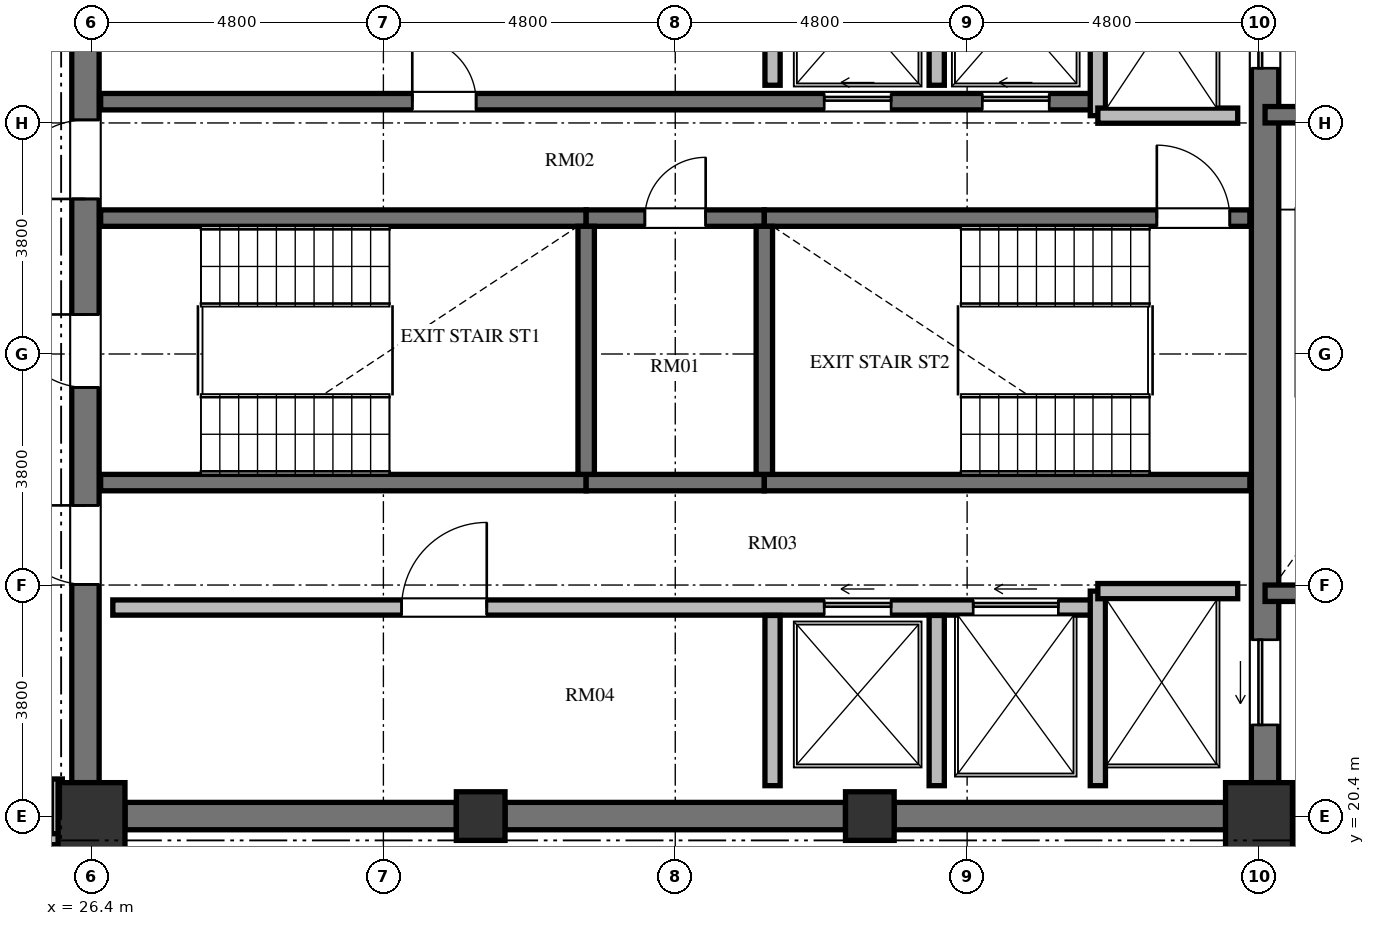
"""IFC4 building model, lengths in metres.
Left out: names, types, materials, properties, quantities, classifications, styles, units other than length and angle.
Written with IfcOpenShell. Run it as: python <this file> out.ifc"""

import sys

from ifc_helpers import new_model, si_unit, direction, frame, frame_2d, origin, origin_2d, place, context, subcontext, project, spatial, rectangle, extrude, element, fill, save


model = new_model("IFC4")
c1 = context("Model", 3, precision=1e-05, world=origin(), true_north=direction((0.0, 1.0)))
c2 = subcontext(c1, "Body", "Model", "MODEL_VIEW")
j1 = project(units=[si_unit("LENGTHUNIT", "METRE"), si_unit("PLANEANGLEUNIT", "RADIAN")], contexts=[c1])
p1 = place(None, origin())
s1 = spatial("IfcSite", under=j1, at=p1, CompositionType="ELEMENT")
p2 = place(p1, origin())
s2 = spatial("IfcBuilding", under=s1, at=p2, CompositionType="ELEMENT")
p3 = place(p2, frame((0.0, 0.0, 238.608)))
s3 = spatial("IfcBuildingStorey", under=s2, at=p3, CompositionType="ELEMENT", Elevation=238.608)
p4 = place(p3, frame((26.4, 20.4, 0.0), z_axis=(0.0, 0.0, 1.0), x_axis=(1.0, 0.0, 0.0)))
e1 = element("IfcColumn", 1, at=p4, inside=s3, PredefinedType="COLUMN", context=c2, shape_type="SweptSolid", body=[
    extrude(rectangle(XDim=1.1, YDim=1.1, at=origin_2d()), origin(), (0.0, 0.0, 1.0), 3.648),
])
for number, where, z_axis, x_axis in (
    (2, (32.8, 20.4, 0.0), (0.0, 0.0, 1.0), (1.0, 0.0, 0.0)),
    (3, (39.2, 20.4, 0.0), (0.0, 0.0, 1.0), (1.0, 0.0, 0.0)),
):
    element("IfcColumn", number, at=place(p3, frame(where, z_axis=z_axis, x_axis=x_axis)), inside=s3, PredefinedType="COLUMN", context=c2, shape_type="SweptSolid", body=[
        extrude(rectangle(XDim=0.8, YDim=0.8, at=origin_2d()), origin(), (0.0, 0.0, 1.0), 3.648),
    ])
p5 = place(p3, frame((45.6, 20.4, 0.0), z_axis=(0.0, 0.0, 1.0), x_axis=(1.0, 0.0, 0.0)))
e4 = element("IfcColumn", 4, at=p5, inside=s3, PredefinedType="COLUMN", context=c2, shape_type="SweptSolid", body=[
    extrude(rectangle(XDim=1.1, YDim=1.1, at=origin_2d()), origin(), (0.0, 0.0, 1.0), 3.648),
])
p6 = place(p3, frame((26.3, 20.95, 0.0), z_axis=(0.0, 0.0, 1.0), x_axis=(0.0, 1.0, 0.0)))
e5 = element("IfcWall", 5, at=p6, inside=s3, PredefinedType="SHEAR", context=c2, shape_type="SweptSolid", body=[
    extrude(rectangle(XDim=14.1, YDim=0.45, at=frame_2d((7.05, 0.0))), origin(), (0.0, 0.0, 1.0), 3.648),
])
p7 = place(p6, frame((6.5, 0.0, 0.0)))
e6 = element("IfcOpeningElement", 6, at=p7, cuts=e5, PredefinedType="OPENING", context=c2, shape_type="SweptSolid", body=[
    extrude(rectangle(XDim=1.2, YDim=2.15, at=frame_2d((0.6, 1.075))), frame((0.0, 0.235, 0.0), z_axis=(0.0, -1.0, 0.0), x_axis=(1.0, 0.0, 0.0)), (0.0, 0.0, 1.0), 0.47),
])
p8 = place(p6, frame((9.6, 0.0, 0.0)))
e7 = element("IfcOpeningElement", 7, at=p8, cuts=e5, PredefinedType="OPENING", context=c2, shape_type="SweptSolid", body=[
    extrude(rectangle(XDim=1.3, YDim=2.2, at=frame_2d((0.65, 1.1))), frame((0.0, 0.235, 0.0), z_axis=(0.0, -1.0, 0.0), x_axis=(1.0, 0.0, 0.0)), (0.0, 0.0, 1.0), 0.47),
])
p9 = place(p6, frame((3.26, 0.0, 0.0)))
e8 = element("IfcOpeningElement", 8, at=p9, cuts=e5, PredefinedType="OPENING", context=c2, shape_type="SweptSolid", body=[
    extrude(rectangle(XDim=1.3, YDim=2.2, at=frame_2d((0.65, 1.1))), frame((0.0, 0.235, 0.0), z_axis=(0.0, -1.0, 0.0), x_axis=(1.0, 0.0, 0.0)), (0.0, 0.0, 1.0), 0.47),
])
p10 = place(p3, frame((45.7, 20.95, 0.0), z_axis=(0.0, 0.0, 1.0), x_axis=(0.0, 1.0, 0.0)))
e9 = element("IfcWall", 9, at=p10, inside=s3, PredefinedType="SHEAR", context=c2, shape_type="SweptSolid", body=[
    extrude(rectangle(XDim=14.1, YDim=0.45, at=frame_2d((7.05, 0.0))), origin(), (0.0, 0.0, 1.0), 3.648),
])
p11 = place(p10, frame((11.75, 0.0, 0.0)))
e10 = element("IfcOpeningElement", 10, at=p11, cuts=e9, PredefinedType="OPENING", context=c2, shape_type="SweptSolid", body=[
    extrude(rectangle(XDim=1.4, YDim=2.3, at=frame_2d((0.7, 1.15))), frame((0.0, 0.235, 0.0), z_axis=(0.0, -1.0, 0.0), x_axis=(1.0, 0.0, 0.0)), (0.0, 0.0, 1.0), 0.47),
])
p12 = place(p10, frame((0.95, 0.0, 0.0)))
e11 = element("IfcOpeningElement", 11, at=p12, cuts=e9, PredefinedType="OPENING", context=c2, shape_type="SweptSolid", body=[
    extrude(rectangle(XDim=1.4, YDim=2.3, at=frame_2d((0.7, 1.15))), frame((0.0, 0.235, 0.0), z_axis=(0.0, -1.0, 0.0), x_axis=(1.0, 0.0, 0.0)), (0.0, 0.0, 1.0), 0.47),
])
p13 = place(p3, frame((26.95, 20.4, 0.0), z_axis=(0.0, 0.0, 1.0), x_axis=(1.0, 0.0, 0.0)))
e12 = element("IfcWall", 12, at=p13, inside=s3, PredefinedType="SHEAR", context=c2, shape_type="SweptSolid", body=[
    extrude(rectangle(XDim=5.45, YDim=0.45, at=frame_2d((2.725, 0.0))), origin(), (0.0, 0.0, 1.0), 3.648),
])
p14 = place(p3, frame((33.2, 20.4, 0.0), z_axis=(0.0, 0.0, 1.0), x_axis=(1.0, 0.0, 0.0)))
e13 = element("IfcWall", 13, at=p14, inside=s3, PredefinedType="SHEAR", context=c2, shape_type="SweptSolid", body=[
    extrude(rectangle(XDim=5.6, YDim=0.45, at=frame_2d((2.8, 0.0))), origin(), (0.0, 0.0, 1.0), 3.648),
])
p15 = place(p3, frame((39.6, 20.4, 0.0), z_axis=(0.0, 0.0, 1.0), x_axis=(1.0, 0.0, 0.0)))
e14 = element("IfcWall", 14, at=p15, inside=s3, PredefinedType="SHEAR", context=c2, shape_type="SweptSolid", body=[
    extrude(rectangle(XDim=5.45, YDim=0.45, at=frame_2d((2.725, 0.0))), origin(), (0.0, 0.0, 1.0), 3.648),
])
p16 = place(p3, frame((26.55, 30.235, 0.0), z_axis=(0.0, 0.0, 1.0), x_axis=(1.0, 0.0, 0.0)))
e15 = element("IfcWall", 15, at=p16, inside=s3, PredefinedType="SHEAR", context=c2, shape_type="SweptSolid", body=[
    extrude(rectangle(XDim=7.985, YDim=0.27, at=frame_2d((3.992, 0.0))), origin(), (0.0, 0.0, 1.0), 3.648),
])
p17 = place(p3, frame((34.535, 30.235, 0.0), z_axis=(0.0, 0.0, 1.0), x_axis=(1.0, 0.0, 0.0)))
e16 = element("IfcWall", 16, at=p17, inside=s3, PredefinedType="SHEAR", context=c2, shape_type="SweptSolid", body=[
    extrude(rectangle(XDim=2.93, YDim=0.27, at=frame_2d((1.465, 0.0))), origin(), (0.0, 0.0, 1.0), 3.648),
])
p18 = place(p17, frame((0.965, 0.0, 0.0)))
e17 = element("IfcOpeningElement", 17, at=p18, cuts=e16, PredefinedType="OPENING", context=c2, shape_type="SweptSolid", body=[
    extrude(rectangle(XDim=1.0, YDim=2.1, at=frame_2d((0.5, 1.05))), frame((0.0, 0.145, 0.0), z_axis=(0.0, -1.0, 0.0), x_axis=(1.0, 0.0, 0.0)), (0.0, 0.0, 1.0), 0.29),
])
p19 = place(p3, frame((37.465, 30.235, 0.0), z_axis=(0.0, 0.0, 1.0), x_axis=(1.0, 0.0, 0.0)))
e18 = element("IfcWall", 18, at=p19, inside=s3, PredefinedType="SHEAR", context=c2, shape_type="SweptSolid", body=[
    extrude(rectangle(XDim=7.985, YDim=0.27, at=frame_2d((3.992, 0.0))), origin(), (0.0, 0.0, 1.0), 3.648),
])
p20 = place(p19, frame((6.455, 0.0, 0.0)))
e19 = element("IfcOpeningElement", 19, at=p20, cuts=e18, PredefinedType="OPENING", context=c2, shape_type="SweptSolid", body=[
    extrude(rectangle(XDim=1.2, YDim=2.15, at=frame_2d((0.6, 1.075))), frame((0.0, 0.145, 0.0), z_axis=(0.0, -1.0, 0.0), x_axis=(1.0, 0.0, 0.0)), (0.0, 0.0, 1.0), 0.29),
])
p21 = place(p3, frame((26.55, 25.885, 0.0), z_axis=(0.0, 0.0, 1.0), x_axis=(1.0, 0.0, 0.0)))
e20 = element("IfcWall", 20, at=p21, inside=s3, PredefinedType="SHEAR", context=c2, shape_type="SweptSolid", body=[
    extrude(rectangle(XDim=7.985, YDim=0.27, at=frame_2d((3.992, 0.0))), origin(), (0.0, 0.0, 1.0), 3.648),
])
p22 = place(p3, frame((34.535, 25.885, 0.0), z_axis=(0.0, 0.0, 1.0), x_axis=(1.0, 0.0, 0.0)))
e21 = element("IfcWall", 21, at=p22, inside=s3, PredefinedType="SHEAR", context=c2, shape_type="SweptSolid", body=[
    extrude(rectangle(XDim=2.93, YDim=0.27, at=frame_2d((1.465, 0.0))), origin(), (0.0, 0.0, 1.0), 3.648),
])
p23 = place(p3, frame((37.465, 25.885, 0.0), z_axis=(0.0, 0.0, 1.0), x_axis=(1.0, 0.0, 0.0)))
e22 = element("IfcWall", 22, at=p23, inside=s3, PredefinedType="SHEAR", context=c2, shape_type="SweptSolid", body=[
    extrude(rectangle(XDim=7.985, YDim=0.27, at=frame_2d((3.992, 0.0))), origin(), (0.0, 0.0, 1.0), 3.648),
])
for number, where, z_axis, x_axis in (
    (23, (34.535, 26.02, 0.0), (0.0, 0.0, 1.0), (0.0, 1.0, 0.0)),
    (24, (37.465, 26.02, 0.0), (0.0, 0.0, 1.0), (0.0, 1.0, 0.0)),
):
    element("IfcWall", number, at=place(p3, frame(where, z_axis=z_axis, x_axis=x_axis)), inside=s3, PredefinedType="SHEAR", context=c2, shape_type="SweptSolid", body=[
        extrude(rectangle(XDim=4.08, YDim=0.27, at=frame_2d((2.04, 0.0))), origin(), (0.0, 0.0, 1.0), 3.648),
    ])
p24 = place(p3, frame((26.55, 32.15, 0.0), z_axis=(0.0, 0.0, 1.0), x_axis=(1.0, 0.0, 0.0)))
e25 = element("IfcWall", 25, at=p24, inside=s3, PredefinedType="SHEAR", context=c2, shape_type="SweptSolid", body=[
    extrude(rectangle(XDim=16.4, YDim=0.27, at=frame_2d((8.2, 0.0))), origin(), (0.0, 0.0, 1.0), 3.648),
])
p25 = place(p24, frame((5.125, 0.0, 0.0)))
e26 = element("IfcOpeningElement", 26, at=p25, cuts=e25, PredefinedType="OPENING", context=c2, shape_type="SweptSolid", body=[
    extrude(rectangle(XDim=1.05, YDim=2.15, at=frame_2d((0.525, 1.075))), frame((0.0, 0.145, 0.0), z_axis=(0.0, -1.0, 0.0), x_axis=(1.0, 0.0, 0.0)), (0.0, 0.0, 1.0), 0.29),
])
p26 = place(p24, frame((11.9, 0.0, 0.0)))
e27 = element("IfcOpeningElement", 27, at=p26, cuts=e25, PredefinedType="OPENING", context=c2, shape_type="SweptSolid", body=[
    extrude(rectangle(XDim=1.1, YDim=2.2, at=frame_2d((0.55, 1.1))), frame((0.0, 0.145, 0.0), z_axis=(0.0, -1.0, 0.0), x_axis=(1.0, 0.0, 0.0)), (0.0, 0.0, 1.0), 0.29),
])
p27 = place(p24, frame((14.5, 0.0, 0.0)))
e28 = element("IfcOpeningElement", 28, at=p27, cuts=e25, PredefinedType="OPENING", context=c2, shape_type="SweptSolid", body=[
    extrude(rectangle(XDim=1.1, YDim=2.2, at=frame_2d((0.55, 1.1))), frame((0.0, 0.145, 0.0), z_axis=(0.0, -1.0, 0.0), x_axis=(1.0, 0.0, 0.0)), (0.0, 0.0, 1.0), 0.29),
])
p28 = place(p3, frame((26.75, 23.83, 0.0), z_axis=(0.0, 0.0, 1.0), x_axis=(1.0, 0.0, 0.0)))
e29 = element("IfcWall", 29, at=p28, inside=s3, PredefinedType="SOLIDWALL", context=c2, shape_type="SweptSolid", body=[
    extrude(rectangle(XDim=16.2, YDim=0.25, at=frame_2d((8.1, 0.0))), origin(), (0.0, 0.0, 1.0), 3.448),
])
p29 = place(p28, frame((4.75, 0.0, 0.0)))
e30 = element("IfcOpeningElement", 30, at=p29, cuts=e29, PredefinedType="OPENING", context=c2, shape_type="SweptSolid", body=[
    extrude(rectangle(XDim=1.4, YDim=2.2, at=frame_2d((0.7, 1.1))), frame((0.0, 0.135, 0.0), z_axis=(0.0, -1.0, 0.0), x_axis=(1.0, 0.0, 0.0)), (0.0, 0.0, 1.0), 0.27),
])
p30 = place(p28, frame((11.7, 0.0, 0.0)))
e31 = element("IfcOpeningElement", 31, at=p30, cuts=e29, PredefinedType="OPENING", context=c2, shape_type="SweptSolid", body=[
    extrude(rectangle(XDim=1.1, YDim=2.2, at=frame_2d((0.55, 1.1))), frame((0.0, 0.135, 0.0), z_axis=(0.0, -1.0, 0.0), x_axis=(1.0, 0.0, 0.0)), (0.0, 0.0, 1.0), 0.27),
])
p31 = place(p28, frame((14.15, 0.0, 0.0)))
e32 = element("IfcOpeningElement", 32, at=p31, cuts=e29, PredefinedType="OPENING", context=c2, shape_type="SweptSolid", body=[
    extrude(rectangle(XDim=1.4, YDim=2.3, at=frame_2d((0.7, 1.15))), frame((0.0, 0.135, 0.0), z_axis=(0.0, -1.0, 0.0), x_axis=(1.0, 0.0, 0.0)), (0.0, 0.0, 1.0), 0.27),
])
p32 = place(p3, frame((42.95, 31.92, 0.0), z_axis=(0.0, 0.0, 1.0), x_axis=(0.0, 1.0, 0.0)))
e33 = element("IfcWall", 33, at=p32, inside=s3, PredefinedType="SOLIDWALL", context=c2, shape_type="SweptSolid", body=[
    extrude(rectangle(XDim=3.18, YDim=0.25, at=frame_2d((1.59, 0.0))), origin(), (0.0, 0.0, 1.0), 3.448),
])
p33 = place(p3, frame((42.95, 31.92, 0.0), z_axis=(0.0, 0.0, 1.0), x_axis=(1.0, 0.0, 0.0)))
e34 = element("IfcWall", 34, at=p33, inside=s3, PredefinedType="SOLIDWALL", context=c2, shape_type="SweptSolid", body=[
    extrude(rectangle(XDim=2.3, YDim=0.25, at=frame_2d((1.15, 0.0))), origin(), (0.0, 0.0, 1.0), 3.448),
])
p34 = place(p3, frame((42.95, 20.9, 0.0), z_axis=(0.0, 0.0, 1.0), x_axis=(0.0, 1.0, 0.0)))
e35 = element("IfcWall", 35, at=p34, inside=s3, PredefinedType="SOLIDWALL", context=c2, shape_type="SweptSolid", body=[
    extrude(rectangle(XDim=3.2, YDim=0.25, at=frame_2d((1.6, 0.0))), origin(), (0.0, 0.0, 1.0), 3.448),
])
p35 = place(p3, frame((42.95, 24.1, 0.0), z_axis=(0.0, 0.0, 1.0), x_axis=(1.0, 0.0, 0.0)))
e36 = element("IfcWall", 36, at=p35, inside=s3, PredefinedType="SOLIDWALL", context=c2, shape_type="SweptSolid", body=[
    extrude(rectangle(XDim=2.3, YDim=0.25, at=frame_2d((1.15, 0.0))), origin(), (0.0, 0.0, 1.0), 3.448),
])
p36 = place(p3, frame((37.6, 32.42, 0.0), z_axis=(0.0, 0.0, 1.0), x_axis=(0.0, 1.0, 0.0)))
e37 = element("IfcWall", 37, at=p36, inside=s3, PredefinedType="SOLIDWALL", context=c2, shape_type="SweptSolid", body=[
    extrude(rectangle(XDim=2.68, YDim=0.25, at=frame_2d((1.34, 0.0))), origin(), (0.0, 0.0, 1.0), 3.448),
])
p37 = place(p3, frame((37.6, 20.9, 0.0), z_axis=(0.0, 0.0, 1.0), x_axis=(0.0, 1.0, 0.0)))
e38 = element("IfcWall", 38, at=p37, inside=s3, PredefinedType="SOLIDWALL", context=c2, shape_type="SweptSolid", body=[
    extrude(rectangle(XDim=2.8, YDim=0.25, at=frame_2d((1.4, 0.0))), origin(), (0.0, 0.0, 1.0), 3.448),
])
p38 = place(p3, frame((40.3, 32.42, 0.0), z_axis=(0.0, 0.0, 1.0), x_axis=(0.0, 1.0, 0.0)))
e39 = element("IfcWall", 39, at=p38, inside=s3, PredefinedType="SOLIDWALL", context=c2, shape_type="SweptSolid", body=[
    extrude(rectangle(XDim=2.68, YDim=0.25, at=frame_2d((1.34, 0.0))), origin(), (0.0, 0.0, 1.0), 3.448),
])
p39 = place(p3, frame((40.3, 20.9, 0.0), z_axis=(0.0, 0.0, 1.0), x_axis=(0.0, 1.0, 0.0)))
e40 = element("IfcWall", 40, at=p39, inside=s3, PredefinedType="SOLIDWALL", context=c2, shape_type="SweptSolid", body=[
    extrude(rectangle(XDim=2.8, YDim=0.25, at=frame_2d((1.4, 0.0))), origin(), (0.0, 0.0, 1.0), 3.448),
])
for number, where, z_axis, x_axis in (
    (41, (45.7, 31.935, 0.0), (0.0, 0.0, 1.0), (1.0, 0.0, 0.0)),
    (42, (45.7, 24.065, 0.0), (0.0, 0.0, 1.0), (1.0, 0.0, 0.0)),
):
    element("IfcWall", number, at=place(p3, frame(where, z_axis=z_axis, x_axis=x_axis)), inside=s3, PredefinedType="SHEAR", context=c2, shape_type="SweptSolid", body=[
        extrude(rectangle(XDim=4.715, YDim=0.27, at=frame_2d((2.357, 0.0))), origin(), (0.0, 0.0, 1.0), 3.648),
    ])
p40 = place(p3, frame((45.7, 20.02, 0.0), z_axis=(0.0, 0.0, 1.0), x_axis=(1.0, 0.0, 0.0)))
e43 = element("IfcWall", 43, at=p40, inside=s3, PredefinedType="SOLIDWALL", context=c2, shape_type="SweptSolid", body=[
    extrude(rectangle(XDim=4.715, YDim=0.25, at=frame_2d((2.357, 0.0))), origin(), (0.0, 0.0, 1.0), 3.448),
])
p41 = place(p3, frame((25.83, 21.01, 0.0), z_axis=(0.0, 0.0, 1.0), x_axis=(0.0, -1.0, 0.0)))
e44 = element("IfcWall", 44, at=p41, inside=s3, PredefinedType="PARTITIONING", context=c2, shape_type="SweptSolid", body=[
    extrude(rectangle(XDim=1.03, YDim=0.18, at=frame_2d((0.515, 0.0))), origin(), (0.0, 0.0, 1.0), 3.448),
])
p42 = place(p3, frame((25.87, 20.02, 0.0), z_axis=(0.0, 0.0, 1.0), x_axis=(-1.0, 0.0, 0.0)))
e45 = element("IfcWall", 45, at=p42, inside=s3, PredefinedType="PARTITIONING", context=c2, shape_type="SweptSolid", body=[
    extrude(rectangle(XDim=2.56, YDim=0.18, at=frame_2d((1.28, 0.0))), origin(), (0.0, 0.0, 1.0), 3.448),
])
p43 = place(p7, origin())
e46 = element("IfcDoor", 46, at=p43, inside=s3, OperationType="SINGLE_SWING_RIGHT", PredefinedType="DOOR", context=c2, shape_type="SweptSolid", body=[
    extrude(rectangle(XDim=1.2, YDim=2.15, at=frame_2d((0.6, 1.075))), frame((0.0, 0.025, 0.0), z_axis=(0.0, -1.0, 0.0), x_axis=(1.0, 0.0, 0.0)), (0.0, 0.0, 1.0), 0.05),
])
fill(e6, e46)
p44 = place(p20, origin())
e47 = element("IfcDoor", 47, at=p44, inside=s3, OperationType="SINGLE_SWING_LEFT", PredefinedType="DOOR", context=c2, shape_type="SweptSolid", body=[
    extrude(rectangle(XDim=1.2, YDim=2.15, at=frame_2d((0.6, 1.075))), frame((0.0, 0.025, 0.0), z_axis=(0.0, -1.0, 0.0), x_axis=(1.0, 0.0, 0.0)), (0.0, 0.0, 1.0), 0.05),
])
fill(e19, e47)
p45 = place(p18, origin())
e48 = element("IfcDoor", 48, at=p45, inside=s3, OperationType="SINGLE_SWING_RIGHT", PredefinedType="DOOR", context=c2, shape_type="SweptSolid", body=[
    extrude(rectangle(XDim=1.0, YDim=2.1, at=frame_2d((0.5, 1.05))), frame((0.0, 0.025, 0.0), z_axis=(0.0, -1.0, 0.0), x_axis=(1.0, 0.0, 0.0)), (0.0, 0.0, 1.0), 0.05),
])
fill(e17, e48)
p46 = place(p8, origin())
e49 = element("IfcDoor", 49, at=p46, inside=s3, OperationType="SINGLE_SWING_LEFT", PredefinedType="DOOR", context=c2, shape_type="SweptSolid", body=[
    extrude(rectangle(XDim=1.3, YDim=2.2, at=frame_2d((0.65, 1.1))), frame((0.0, 0.025, 0.0), z_axis=(0.0, -1.0, 0.0), x_axis=(1.0, 0.0, 0.0)), (0.0, 0.0, 1.0), 0.05),
])
fill(e7, e49)
p47 = place(p9, origin())
e50 = element("IfcDoor", 50, at=p47, inside=s3, OperationType="SINGLE_SWING_RIGHT", PredefinedType="DOOR", context=c2, shape_type="SweptSolid", body=[
    extrude(rectangle(XDim=1.3, YDim=2.2, at=frame_2d((0.65, 1.1))), frame((0.0, 0.025, 0.0), z_axis=(0.0, -1.0, 0.0), x_axis=(1.0, 0.0, 0.0)), (0.0, 0.0, 1.0), 0.05),
])
fill(e8, e50)
p48 = place(p25, origin())
e51 = element("IfcDoor", 51, at=p48, inside=s3, OperationType="SINGLE_SWING_LEFT", PredefinedType="DOOR", context=c2, shape_type="SweptSolid", body=[
    extrude(rectangle(XDim=1.05, YDim=2.15, at=frame_2d((0.525, 1.075))), frame((0.0, 0.025, 0.0), z_axis=(0.0, -1.0, 0.0), x_axis=(1.0, 0.0, 0.0)), (0.0, 0.0, 1.0), 0.05),
])
fill(e26, e51)
p49 = place(p29, origin())
e52 = element("IfcDoor", 52, at=p49, inside=s3, OperationType="SINGLE_SWING_RIGHT", PredefinedType="DOOR", context=c2, shape_type="SweptSolid", body=[
    extrude(rectangle(XDim=1.4, YDim=2.2, at=frame_2d((0.7, 1.1))), frame((0.0, 0.025, 0.0), z_axis=(0.0, -1.0, 0.0), x_axis=(1.0, 0.0, 0.0)), (0.0, 0.0, 1.0), 0.05),
])
fill(e30, e52)
p50 = place(p26, origin())
e53 = element("IfcDoor", 53, at=p50, inside=s3, OperationType="SLIDING_TO_LEFT", PredefinedType="DOOR", context=c2, shape_type="SweptSolid", body=[
    extrude(rectangle(XDim=1.1, YDim=2.2, at=frame_2d((0.55, 1.1))), frame((0.0, 0.025, 0.0), z_axis=(0.0, -1.0, 0.0), x_axis=(1.0, 0.0, 0.0)), (0.0, 0.0, 1.0), 0.05),
])
fill(e27, e53)
p51 = place(p27, origin())
e54 = element("IfcDoor", 54, at=p51, inside=s3, OperationType="SLIDING_TO_LEFT", PredefinedType="DOOR", context=c2, shape_type="SweptSolid", body=[
    extrude(rectangle(XDim=1.1, YDim=2.2, at=frame_2d((0.55, 1.1))), frame((0.0, 0.025, 0.0), z_axis=(0.0, -1.0, 0.0), x_axis=(1.0, 0.0, 0.0)), (0.0, 0.0, 1.0), 0.05),
])
fill(e28, e54)
p52 = place(p30, origin())
e55 = element("IfcDoor", 55, at=p52, inside=s3, OperationType="SLIDING_TO_LEFT", PredefinedType="DOOR", context=c2, shape_type="SweptSolid", body=[
    extrude(rectangle(XDim=1.1, YDim=2.2, at=frame_2d((0.55, 1.1))), frame((0.0, 0.025, 0.0), z_axis=(0.0, -1.0, 0.0), x_axis=(1.0, 0.0, 0.0)), (0.0, 0.0, 1.0), 0.05),
])
fill(e31, e55)
p53 = place(p11, origin())
e56 = element("IfcDoor", 56, at=p53, inside=s3, OperationType="SLIDING_TO_LEFT", PredefinedType="DOOR", context=c2, shape_type="SweptSolid", body=[
    extrude(rectangle(XDim=1.4, YDim=2.3, at=frame_2d((0.7, 1.15))), frame((0.0, 0.025, 0.0), z_axis=(0.0, -1.0, 0.0), x_axis=(1.0, 0.0, 0.0)), (0.0, 0.0, 1.0), 0.05),
])
fill(e10, e56)
p54 = place(p12, origin())
e57 = element("IfcDoor", 57, at=p54, inside=s3, OperationType="SLIDING_TO_LEFT", PredefinedType="DOOR", context=c2, shape_type="SweptSolid", body=[
    extrude(rectangle(XDim=1.4, YDim=2.3, at=frame_2d((0.7, 1.15))), frame((0.0, 0.025, 0.0), z_axis=(0.0, -1.0, 0.0), x_axis=(1.0, 0.0, 0.0)), (0.0, 0.0, 1.0), 0.05),
])
fill(e11, e57)
p55 = place(p31, origin())
e58 = element("IfcDoor", 58, at=p55, inside=s3, OperationType="SLIDING_TO_LEFT", PredefinedType="DOOR", context=c2, shape_type="SweptSolid", body=[
    extrude(rectangle(XDim=1.4, YDim=2.3, at=frame_2d((0.7, 1.15))), frame((0.0, 0.025, 0.0), z_axis=(0.0, -1.0, 0.0), x_axis=(1.0, 0.0, 0.0)), (0.0, 0.0, 1.0), 0.05),
])
fill(e32, e58)
save(model, sys.argv[1])
